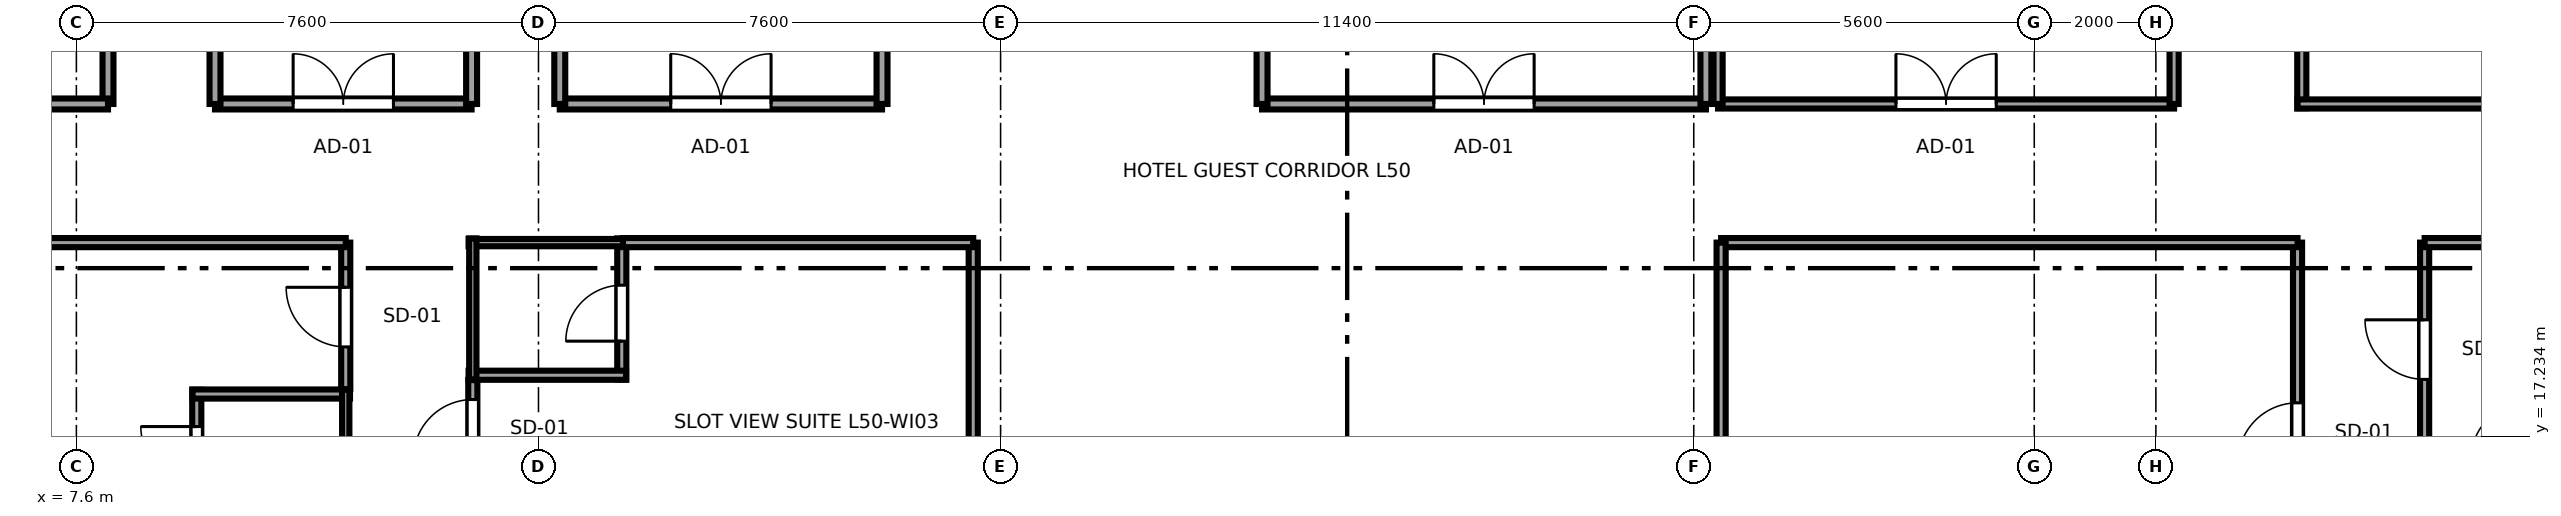
"""IFC4 building model, lengths in metres.
Left out: names, types, materials, properties, quantities, classifications, styles, units other than length and angle.
Written with IfcOpenShell. Run it as: python <this file> out.ifc"""

import sys

from ifc_helpers import new_model, si_unit, direction, frame, frame_2d, origin, place, context, subcontext, project, spatial, rectangle, extrude, source, transform, mapped, element, fill, save


model = new_model("IFC4")
c1 = context("Model", 3, precision=1e-05, world=origin(), true_north=direction((0.0, 1.0)))
c2 = subcontext(c1, "Body", "Model", "MODEL_VIEW")
j1 = project(units=[si_unit("LENGTHUNIT", "METRE"), si_unit("PLANEANGLEUNIT", "RADIAN")], contexts=[c1])
p1 = place(None, origin())
s1 = spatial("IfcSite", under=j1, at=p1, CompositionType="ELEMENT")
p2 = place(p1, origin())
s2 = spatial("IfcBuilding", under=s1, at=p2, CompositionType="ELEMENT")
p3 = place(p2, frame((0.0, 0.0, 191.1)))
s3 = spatial("IfcBuildingStorey", under=s2, at=p3, CompositionType="ELEMENT", Elevation=191.1)
p4 = place(p3, frame((9.58, 16.01, 0.0), z_axis=(0.0, 0.0, 1.0), x_axis=(0.0, 1.0, 0.0)))
e1 = element("IfcWall", 1, at=p4, inside=s3, PredefinedType="PARTITIONING", context=c2, shape_type="SweptSolid", body=[
    extrude(rectangle(XDim=1.99, YDim=0.15, at=frame_2d((0.995, 0.0))), origin(), (0.0, 0.0, 1.0), 3.37),
])
p5 = place(p4, frame((0.465, 0.0, 0.0)))
e2 = element("IfcOpeningElement", 2, at=p5, cuts=e1, PredefinedType="OPENING", context=c2, shape_type="SweptSolid", body=[
    extrude(rectangle(XDim=0.92, YDim=2.01, at=frame_2d((0.46, 1.005))), frame((0.0, 0.085, 0.0), z_axis=(0.0, -1.0, 0.0), x_axis=(1.0, 0.0, 0.0)), (0.0, 0.0, 1.0), 0.17),
])
p6 = place(p3, frame((9.51, 17.93, 0.0), z_axis=(0.0, 0.0, 1.0), x_axis=(1.0, 0.0, 0.0)))
e3 = element("IfcWall", 3, at=p6, inside=s3, PredefinedType="PARTITIONING", context=c2, shape_type="SweptSolid", body=[
    extrude(rectangle(XDim=2.59, YDim=0.15, at=frame_2d((1.295, 0.0))), origin(), (0.0, 0.0, 1.0), 3.37),
])
p7 = place(p3, frame((12.03, 16.01, 0.0), z_axis=(0.0, 0.0, 1.0), x_axis=(0.0, 1.0, 0.0)))
e4 = element("IfcWall", 4, at=p7, inside=s3, PredefinedType="PLUMBINGWALL", context=c2, shape_type="SweptSolid", body=[
    extrude(rectangle(XDim=1.99, YDim=0.12, at=frame_2d((0.995, 0.0))), origin(), (0.0, 0.0, 1.0), 3.37),
])
p8 = place(p3, frame((16.57, 18.169, 0.0), z_axis=(0.0, 0.0, 1.0), x_axis=(0.0, 1.0, 0.0)))
e5 = element("IfcWall", 5, at=p8, inside=s3, PredefinedType="PARTITIONING", context=c2, shape_type="SweptSolid", body=[
    extrude(rectangle(XDim=2.321, YDim=0.15, at=frame_2d((1.161, 0.0))), origin(), (0.0, 0.0, 1.0), 3.37),
])
p9 = place(p8, frame((0.631, 0.0, 0.0)))
e6 = element("IfcOpeningElement", 6, at=p9, cuts=e5, PredefinedType="OPENING", context=c2, shape_type="SweptSolid", body=[
    extrude(rectangle(XDim=0.92, YDim=2.01, at=frame_2d((0.46, 1.005))), frame((0.0, 0.085, 0.0), z_axis=(0.0, -1.0, 0.0), x_axis=(1.0, 0.0, 0.0)), (0.0, 0.0, 1.0), 0.17),
])
p10 = place(p3, frame((14.05, 18.239, 0.0), z_axis=(0.0, 0.0, 1.0), x_axis=(1.0, 0.0, 0.0)))
e7 = element("IfcWall", 7, at=p10, inside=s3, PredefinedType="PARTITIONING", context=c2, shape_type="SweptSolid", body=[
    extrude(rectangle(XDim=2.59, YDim=0.15, at=frame_2d((1.295, 0.0))), origin(), (0.0, 0.0, 1.0), 3.37),
])
p11 = place(p3, frame((14.05, 20.42, 0.0), z_axis=(0.0, 0.0, 1.0), x_axis=(1.0, 0.0, 0.0)))
e8 = element("IfcWall", 8, at=p11, inside=s3, PredefinedType="PLUMBINGWALL", context=c2, shape_type="SweptSolid", body=[
    extrude(rectangle(XDim=2.59, YDim=0.12, at=frame_2d((1.295, 0.0))), origin(), (0.0, 0.0, 1.0), 3.37),
])
p12 = place(p3, frame((14.12, 18.169, 0.0), z_axis=(0.0, 0.0, 1.0), x_axis=(0.0, 1.0, 0.0)))
e9 = element("IfcWall", 9, at=p12, inside=s3, PredefinedType="PLUMBINGWALL", context=c2, shape_type="SweptSolid", body=[
    extrude(rectangle(XDim=2.321, YDim=0.12, at=frame_2d((1.161, 0.0))), origin(), (0.0, 0.0, 1.0), 3.37),
])
p13 = place(p3, frame((12.03, 18.01, 0.0), z_axis=(0.0, 0.0, 1.0), x_axis=(0.0, 1.0, 0.0)))
e10 = element("IfcWall", 10, at=p13, inside=s3, PredefinedType="PARTITIONING", context=c2, shape_type="SweptSolid", body=[
    extrude(rectangle(XDim=2.41, YDim=0.15, at=frame_2d((1.205, 0.0))), origin(), (0.0, 0.0, 1.0), 3.37),
])
p14 = place(p13, frame((0.695, 0.0, 0.0)))
e11 = element("IfcOpeningElement", 11, at=p14, cuts=e10, PredefinedType="OPENING", context=c2, shape_type="SweptSolid", body=[
    extrude(rectangle(XDim=0.98, YDim=2.12, at=frame_2d((0.49, 1.06))), frame((0.0, 0.085, 0.0), z_axis=(0.0, -1.0, 0.0), x_axis=(1.0, 0.0, 0.0)), (0.0, 0.0, 1.0), 0.17),
])
p15 = place(p3, frame((3.005, 20.42, 0.0), z_axis=(0.0, 0.0, 1.0), x_axis=(1.0, 0.0, 0.0)))
e12 = element("IfcWall", 12, at=p15, inside=s3, PredefinedType="PARTITIONING", context=c2, shape_type="SweptSolid", body=[
    extrude(rectangle(XDim=9.025, YDim=0.15, at=frame_2d((4.513, 0.0))), origin(), (0.0, 0.0, 1.0), 3.37),
])
p16 = place(p3, frame((14.12, 14.68, 0.0), z_axis=(0.0, 0.0, 1.0), x_axis=(0.0, 1.0, 0.0)))
e13 = element("IfcWall", 13, at=p16, inside=s3, PredefinedType="PARTITIONING", context=c2, shape_type="SweptSolid", body=[
    extrude(rectangle(XDim=3.479, YDim=0.15, at=frame_2d((1.74, 0.0))), origin(), (0.0, 0.0, 1.0), 3.37),
])
p17 = place(p16, frame((2.179, 0.0, 0.0)))
e14 = element("IfcOpeningElement", 14, at=p17, cuts=e13, PredefinedType="OPENING", context=c2, shape_type="SweptSolid", body=[
    extrude(rectangle(XDim=0.98, YDim=2.12, at=frame_2d((0.49, 1.06))), frame((0.0, 0.085, 0.0), z_axis=(0.0, -1.0, 0.0), x_axis=(1.0, 0.0, 0.0)), (0.0, 0.0, 1.0), 0.17),
])
p18 = place(p3, frame((22.35, 14.68, 0.0), z_axis=(0.0, 0.0, 1.0), x_axis=(0.0, 1.0, 0.0)))
e15 = element("IfcWall", 15, at=p18, inside=s3, PredefinedType="PARTITIONING", context=c2, shape_type="SweptSolid", body=[
    extrude(rectangle(XDim=5.74, YDim=0.15, at=frame_2d((2.87, 0.0))), origin(), (0.0, 0.0, 1.0), 3.37),
])
p19 = place(p3, frame((16.59, 20.42, 0.0), z_axis=(0.0, 0.0, 1.0), x_axis=(1.0, 0.0, 0.0)))
e16 = element("IfcWall", 16, at=p19, inside=s3, PredefinedType="PARTITIONING", context=c2, shape_type="SweptSolid", body=[
    extrude(rectangle(XDim=5.76, YDim=0.15, at=frame_2d((2.88, 0.0))), origin(), (0.0, 0.0, 1.0), 3.37),
])
p20 = place(p3, frame((44.13, 14.21, 0.0), z_axis=(0.0, 0.0, 1.0), x_axis=(0.0, 1.0, 0.0)))
e17 = element("IfcWall", 17, at=p20, inside=s3, PredefinedType="PARTITIONING", context=c2, shape_type="SweptSolid", body=[
    extrude(rectangle(XDim=6.21, YDim=0.15, at=frame_2d((3.105, 0.0))), origin(), (0.0, 0.0, 1.0), 3.37),
])
p21 = place(p20, frame((2.595, 0.0, 0.0)))
e18 = element("IfcOpeningElement", 18, at=p21, cuts=e17, PredefinedType="OPENING", context=c2, shape_type="SweptSolid", body=[
    extrude(rectangle(XDim=0.98, YDim=2.12, at=frame_2d((0.49, 1.06))), frame((0.0, 0.085, 0.0), z_axis=(0.0, -1.0, 0.0), x_axis=(1.0, 0.0, 0.0)), (0.0, 0.0, 1.0), 0.17),
])
p22 = place(p3, frame((34.65, 20.42, 0.0), z_axis=(0.0, 0.0, 1.0), x_axis=(1.0, 0.0, 0.0)))
e19 = element("IfcWall", 19, at=p22, inside=s3, PredefinedType="PARTITIONING", context=c2, shape_type="SweptSolid", body=[
    extrude(rectangle(XDim=9.48, YDim=0.15, at=frame_2d((4.74, 0.0))), origin(), (0.0, 0.0, 1.0), 3.37),
])
p23 = place(p3, frame((34.65, 11.88, 0.0), z_axis=(0.0, 0.0, 1.0), x_axis=(0.0, 1.0, 0.0)))
e20 = element("IfcWall", 20, at=p23, inside=s3, PredefinedType="PARTITIONING", context=c2, shape_type="SweptSolid", body=[
    extrude(rectangle(XDim=8.54, YDim=0.15, at=frame_2d((4.27, 0.0))), origin(), (0.0, 0.0, 1.0), 3.37),
])
p24 = place(p3, frame((46.22, 16.941, 0.0), z_axis=(0.0, 0.0, 1.0), x_axis=(0.0, 1.0, 0.0)))
e21 = element("IfcWall", 21, at=p24, inside=s3, PredefinedType="PARTITIONING", context=c2, shape_type="SweptSolid", body=[
    extrude(rectangle(XDim=3.479, YDim=0.15, at=frame_2d((1.74, 0.0))), origin(), (0.0, 0.0, 1.0), 3.37),
])
p25 = place(p24, frame((1.229, 0.0, 0.0)))
e22 = element("IfcOpeningElement", 22, at=p25, cuts=e21, PredefinedType="OPENING", context=c2, shape_type="SweptSolid", body=[
    extrude(rectangle(XDim=0.98, YDim=2.12, at=frame_2d((0.49, 1.06))), frame((0.0, 0.085, 0.0), z_axis=(0.0, -1.0, 0.0), x_axis=(1.0, 0.0, 0.0)), (0.0, 0.0, 1.0), 0.17),
])
p26 = place(p3, frame((46.22, 20.42, 0.0), z_axis=(0.0, 0.0, 1.0), x_axis=(1.0, 0.0, 0.0)))
e23 = element("IfcWall", 23, at=p26, inside=s3, PredefinedType="PARTITIONING", context=c2, shape_type="SweptSolid", body=[
    extrude(rectangle(XDim=7.775, YDim=0.15, at=frame_2d((3.888, 0.0))), origin(), (0.0, 0.0, 1.0), 3.37),
])
p27 = place(p3, frame((8.12, 22.7, 0.0), z_axis=(0.0, 0.0, 1.0), x_axis=(0.0, 1.0, 0.0)))
e24 = element("IfcWall", 24, at=p27, inside=s3, PredefinedType="PARTITIONING", context=c2, shape_type="SweptSolid", body=[
    extrude(rectangle(XDim=13.1, YDim=0.18, at=frame_2d((6.55, 0.0))), origin(), (0.0, 0.0, 1.0), 3.37),
])
p28 = place(p27, frame((3.35, 0.0, 0.0)))
e25 = element("IfcOpeningElement", 25, at=p28, cuts=e24, PredefinedType="OPENING", context=c2, shape_type="SweptSolid", body=[
    extrude(rectangle(XDim=1.65, YDim=2.15, at=frame_2d((0.825, 1.075))), frame((0.0, 0.1, 0.0), z_axis=(0.0, -1.0, 0.0), x_axis=(1.0, 0.0, 0.0)), (0.0, 0.0, 1.0), 0.2),
])
p29 = place(p3, frame((3.005, 22.7, 0.0), z_axis=(0.0, 0.0, 1.0), x_axis=(1.0, 0.0, 0.0)))
e26 = element("IfcWall", 26, at=p29, inside=s3, PredefinedType="PARTITIONING", context=c2, shape_type="SweptSolid", body=[
    extrude(rectangle(XDim=5.115, YDim=0.18, at=frame_2d((2.558, 0.0))), origin(), (0.0, 0.0, 1.0), 3.37),
])
p30 = place(p3, frame((44.2, 22.63, 0.0), z_axis=(0.0, 0.0, 1.0), x_axis=(0.0, 1.0, 0.0)))
e27 = element("IfcWall", 27, at=p30, inside=s3, PredefinedType="PARTITIONING", context=c2, shape_type="SweptSolid", body=[
    extrude(rectangle(XDim=3.74, YDim=0.15, at=frame_2d((1.87, 0.0))), origin(), (0.0, 0.0, 1.0), 3.37),
])
p31 = place(p30, frame((1.24, 0.0, 0.0)))
e28 = element("IfcOpeningElement", 28, at=p31, cuts=e27, PredefinedType="OPENING", context=c2, shape_type="SweptSolid", body=[
    extrude(rectangle(XDim=0.92, YDim=2.01, at=frame_2d((0.46, 1.005))), frame((0.0, 0.085, 0.0), z_axis=(0.0, -1.0, 0.0), x_axis=(1.0, 0.0, 0.0)), (0.0, 0.0, 1.0), 0.17),
])
p32 = place(p3, frame((44.13, 22.7, 0.0), z_axis=(0.0, 0.0, 1.0), x_axis=(1.0, 0.0, 0.0)))
e29 = element("IfcWall", 29, at=p32, inside=s3, PredefinedType="PARTITIONING", context=c2, shape_type="SweptSolid", body=[
    extrude(rectangle(XDim=4.54, YDim=0.15, at=frame_2d((2.27, 0.0))), origin(), (0.0, 0.0, 1.0), 3.37),
])
p33 = place(p3, frame((9.88, 22.7, 0.0), z_axis=(0.0, 0.0, 1.0), x_axis=(1.0, 0.0, 0.0)))
e30 = element("IfcWall", 30, at=p33, inside=s3, PredefinedType="PARTITIONING", context=c2, shape_type="SweptSolid", body=[
    extrude(rectangle(XDim=4.22, YDim=0.18, at=frame_2d((2.11, 0.0))), origin(), (0.0, 0.0, 1.0), 3.37),
])
p34 = place(p33, frame((1.285, 0.0, 0.0)))
e31 = element("IfcOpeningElement", 31, at=p34, cuts=e30, PredefinedType="OPENING", context=c2, shape_type="SweptSolid", body=[
    extrude(rectangle(XDim=1.65, YDim=2.15, at=frame_2d((0.825, 1.075))), frame((0.0, 0.1, 0.0), z_axis=(0.0, -1.0, 0.0), x_axis=(1.0, 0.0, 0.0)), (0.0, 0.0, 1.0), 0.2),
])
for number, where, z_axis, x_axis in (
    (32, (9.88, 22.7, 0.0), (0.0, 0.0, 1.0), (0.0, 1.0, 0.0)),
    (33, (14.1, 22.7, 0.0), (0.0, 0.0, 1.0), (0.0, 1.0, 0.0)),
):
    element("IfcWall", number, at=place(p3, frame(where, z_axis=z_axis, x_axis=x_axis)), inside=s3, PredefinedType="PARTITIONING", context=c2, shape_type="SweptSolid", body=[
        extrude(rectangle(XDim=7.05, YDim=0.18, at=frame_2d((3.525, 0.0))), origin(), (0.0, 0.0, 1.0), 3.37),
    ])
p35 = place(p3, frame((27.1, 22.7, 0.0), z_axis=(0.0, 0.0, 1.0), x_axis=(1.0, 0.0, 0.0)))
e34 = element("IfcWall", 34, at=p35, inside=s3, PredefinedType="PARTITIONING", context=c2, shape_type="SweptSolid", body=[
    extrude(rectangle(XDim=7.3, YDim=0.18, at=frame_2d((3.65, 0.0))), origin(), (0.0, 0.0, 1.0), 3.37),
])
p36 = place(p35, frame((2.825, 0.0, 0.0)))
e35 = element("IfcOpeningElement", 35, at=p36, cuts=e34, PredefinedType="OPENING", context=c2, shape_type="SweptSolid", body=[
    extrude(rectangle(XDim=1.65, YDim=2.15, at=frame_2d((0.825, 1.075))), frame((0.0, 0.1, 0.0), z_axis=(0.0, -1.0, 0.0), x_axis=(1.0, 0.0, 0.0)), (0.0, 0.0, 1.0), 0.2),
])
for number, where, z_axis, x_axis in (
    (36, (27.1, 22.7, 0.0), (0.0, 0.0, 1.0), (0.0, 1.0, 0.0)),
    (37, (34.4, 22.7, 0.0), (0.0, 0.0, 1.0), (0.0, 1.0, 0.0)),
):
    element("IfcWall", number, at=place(p3, frame(where, z_axis=z_axis, x_axis=x_axis)), inside=s3, PredefinedType="PARTITIONING", context=c2, shape_type="SweptSolid", body=[
        extrude(rectangle(XDim=7.1, YDim=0.18, at=frame_2d((3.55, 0.0))), origin(), (0.0, 0.0, 1.0), 3.37),
    ])
p37 = place(p3, frame((15.55, 22.7, 0.0), z_axis=(0.0, 0.0, 1.0), x_axis=(1.0, 0.0, 0.0)))
e38 = element("IfcWall", 38, at=p37, inside=s3, PredefinedType="PARTITIONING", context=c2, shape_type="SweptSolid", body=[
    extrude(rectangle(XDim=5.3, YDim=0.18, at=frame_2d((2.65, 0.0))), origin(), (0.0, 0.0, 1.0), 3.37),
])
p38 = place(p37, frame((1.825, 0.0, 0.0)))
e39 = element("IfcOpeningElement", 39, at=p38, cuts=e38, PredefinedType="OPENING", context=c2, shape_type="SweptSolid", body=[
    extrude(rectangle(XDim=1.65, YDim=2.15, at=frame_2d((0.825, 1.075))), frame((0.0, 0.1, 0.0), z_axis=(0.0, -1.0, 0.0), x_axis=(1.0, 0.0, 0.0)), (0.0, 0.0, 1.0), 0.2),
])
for number, where, z_axis, x_axis in (
    (40, (15.55, 22.7, 0.0), (0.0, 0.0, 1.0), (0.0, 1.0, 0.0)),
    (41, (20.85, 22.7, 0.0), (0.0, 0.0, 1.0), (0.0, 1.0, 0.0)),
):
    element("IfcWall", number, at=place(p3, frame(where, z_axis=z_axis, x_axis=x_axis)), inside=s3, PredefinedType="PARTITIONING", context=c2, shape_type="SweptSolid", body=[
        extrude(rectangle(XDim=7.1, YDim=0.18, at=frame_2d((3.55, 0.0))), origin(), (0.0, 0.0, 1.0), 3.37),
    ])
p39 = place(p3, frame((34.6, 22.7, 0.0), z_axis=(0.0, 0.0, 1.0), x_axis=(1.0, 0.0, 0.0)))
e42 = element("IfcWall", 42, at=p39, inside=s3, PredefinedType="PARTITIONING", context=c2, shape_type="SweptSolid", body=[
    extrude(rectangle(XDim=7.5, YDim=0.15, at=frame_2d((3.75, 0.0))), origin(), (0.0, 0.0, 1.0), 3.37),
])
p40 = place(p39, frame((2.925, 0.0, 0.0)))
e43 = element("IfcOpeningElement", 43, at=p40, cuts=e42, PredefinedType="OPENING", context=c2, shape_type="SweptSolid", body=[
    extrude(rectangle(XDim=1.65, YDim=2.15, at=frame_2d((0.825, 1.075))), frame((0.0, 0.085, 0.0), z_axis=(0.0, -1.0, 0.0), x_axis=(1.0, 0.0, 0.0)), (0.0, 0.0, 1.0), 0.17),
])
p41 = place(p3, frame((34.6, 22.7, 0.0), z_axis=(0.0, 0.0, 1.0), x_axis=(0.0, 1.0, 0.0)))
e44 = element("IfcWall", 44, at=p41, inside=s3, PredefinedType="PARTITIONING", context=c2, shape_type="SweptSolid", body=[
    extrude(rectangle(XDim=6.7, YDim=0.15, at=frame_2d((3.35, 0.0))), origin(), (0.0, 0.0, 1.0), 3.37),
])
p42 = place(p3, frame((42.1, 22.7, 0.0), z_axis=(0.0, 0.0, 1.0), x_axis=(0.0, 1.0, 0.0)))
e45 = element("IfcWall", 45, at=p42, inside=s3, PredefinedType="PARTITIONING", context=c2, shape_type="SweptSolid", body=[
    extrude(rectangle(XDim=6.7, YDim=0.15, at=frame_2d((3.35, 0.0))), origin(), (0.0, 0.0, 1.0), 2.16),
])
m1 = source(origin(), c2, "Body", "SweptSolid", [
    extrude(rectangle(XDim=0.92, YDim=2.01, at=frame_2d((0.46, 1.005))), frame((0.0, 0.025, 0.0), z_axis=(0.0, -1.0, 0.0), x_axis=(1.0, 0.0, 0.0)), (0.0, 0.0, 1.0), 0.05),
])
p43 = place(p5, origin())
e46 = element("IfcDoor", 46, at=p43, inside=s3, OperationType="SINGLE_SWING_RIGHT", PredefinedType="DOOR", context=c2, shape_type="MappedRepresentation", body=[
    mapped(m1, transform((0.0, 0.0, 0.0), x_axis=(1.0, 0.0, 0.0), y_axis=(0.0, 1.0, 0.0), z_axis=(0.0, 0.0, 1.0), scale=1.0)),
])
fill(e2, e46)
p44 = place(p9, origin())
e47 = element("IfcDoor", 47, at=p44, inside=s3, OperationType="SINGLE_SWING_LEFT", PredefinedType="DOOR", context=c2, shape_type="MappedRepresentation", body=[
    mapped(m1, transform((0.0, 0.0, 0.0), x_axis=(1.0, 0.0, 0.0), y_axis=(0.0, 1.0, 0.0), z_axis=(0.0, 0.0, 1.0), scale=1.0)),
])
fill(e6, e47)
m2 = source(origin(), c2, "Body", "SweptSolid", [
    extrude(rectangle(XDim=0.98, YDim=2.12, at=frame_2d((0.49, 1.06))), frame((0.0, 0.025, 0.0), z_axis=(0.0, -1.0, 0.0), x_axis=(1.0, 0.0, 0.0)), (0.0, 0.0, 1.0), 0.05),
])
p45 = place(p14, origin())
e48 = element("IfcDoor", 48, at=p45, inside=s3, OperationType="SINGLE_SWING_RIGHT", PredefinedType="DOOR", context=c2, shape_type="MappedRepresentation", body=[
    mapped(m2, transform((0.0, 0.0, 0.0), x_axis=(1.0, 0.0, 0.0), y_axis=(0.0, 1.0, 0.0), z_axis=(0.0, 0.0, 1.0), scale=1.0)),
])
fill(e11, e48)
p46 = place(p17, origin())
e49 = element("IfcDoor", 49, at=p46, inside=s3, OperationType="SINGLE_SWING_LEFT", PredefinedType="DOOR", context=c2, shape_type="MappedRepresentation", body=[
    mapped(m2, transform((0.0, 0.0, 0.0), x_axis=(1.0, 0.0, 0.0), y_axis=(0.0, 1.0, 0.0), z_axis=(0.0, 0.0, 1.0), scale=1.0)),
])
fill(e14, e49)
p47 = place(p21, origin())
e50 = element("IfcDoor", 50, at=p47, inside=s3, OperationType="SINGLE_SWING_LEFT", PredefinedType="DOOR", context=c2, shape_type="MappedRepresentation", body=[
    mapped(m2, transform((0.0, 0.0, 0.0), x_axis=(1.0, 0.0, 0.0), y_axis=(0.0, 1.0, 0.0), z_axis=(0.0, 0.0, 1.0), scale=1.0)),
])
fill(e18, e50)
p48 = place(p25, origin())
e51 = element("IfcDoor", 51, at=p48, inside=s3, OperationType="SINGLE_SWING_RIGHT", PredefinedType="DOOR", context=c2, shape_type="MappedRepresentation", body=[
    mapped(m2, transform((0.0, 0.0, 0.0), x_axis=(1.0, 0.0, 0.0), y_axis=(0.0, 1.0, 0.0), z_axis=(0.0, 0.0, 1.0), scale=1.0)),
])
fill(e22, e51)
m3 = source(origin(), c2, "Body", "SweptSolid", [
    extrude(rectangle(XDim=1.65, YDim=2.15, at=frame_2d((0.825, 1.075))), frame((0.0, 0.025, 0.0), z_axis=(0.0, -1.0, 0.0), x_axis=(1.0, 0.0, 0.0)), (0.0, 0.0, 1.0), 0.05),
])
p49 = place(p34, origin())
e52 = element("IfcDoor", 52, at=p49, inside=s3, OperationType="DOUBLE_DOOR_SINGLE_SWING", PredefinedType="DOOR", context=c2, shape_type="MappedRepresentation", body=[
    mapped(m3, transform((0.0, 0.0, 0.0), x_axis=(1.0, 0.0, 0.0), y_axis=(0.0, 1.0, 0.0), z_axis=(0.0, 0.0, 1.0), scale=1.0)),
])
fill(e31, e52)
p50 = place(p36, origin())
e53 = element("IfcDoor", 53, at=p50, inside=s3, OperationType="DOUBLE_DOOR_SINGLE_SWING", PredefinedType="DOOR", context=c2, shape_type="MappedRepresentation", body=[
    mapped(m3, transform((0.0, 0.0, 0.0), x_axis=(1.0, 0.0, 0.0), y_axis=(0.0, 1.0, 0.0), z_axis=(0.0, 0.0, 1.0), scale=1.0)),
])
fill(e35, e53)
p51 = place(p38, origin())
e54 = element("IfcDoor", 54, at=p51, inside=s3, OperationType="DOUBLE_DOOR_SINGLE_SWING", PredefinedType="DOOR", context=c2, shape_type="MappedRepresentation", body=[
    mapped(m3, transform((0.0, 0.0, 0.0), x_axis=(1.0, 0.0, 0.0), y_axis=(0.0, 1.0, 0.0), z_axis=(0.0, 0.0, 1.0), scale=1.0)),
])
fill(e39, e54)
p52 = place(p40, origin())
e55 = element("IfcDoor", 55, at=p52, inside=s3, OperationType="DOUBLE_DOOR_SINGLE_SWING", PredefinedType="DOOR", context=c2, shape_type="MappedRepresentation", body=[
    mapped(m3, transform((0.0, 0.0, 0.0), x_axis=(1.0, 0.0, 0.0), y_axis=(0.0, 1.0, 0.0), z_axis=(0.0, 0.0, 1.0), scale=1.0)),
])
fill(e43, e55)
save(model, sys.argv[1])
